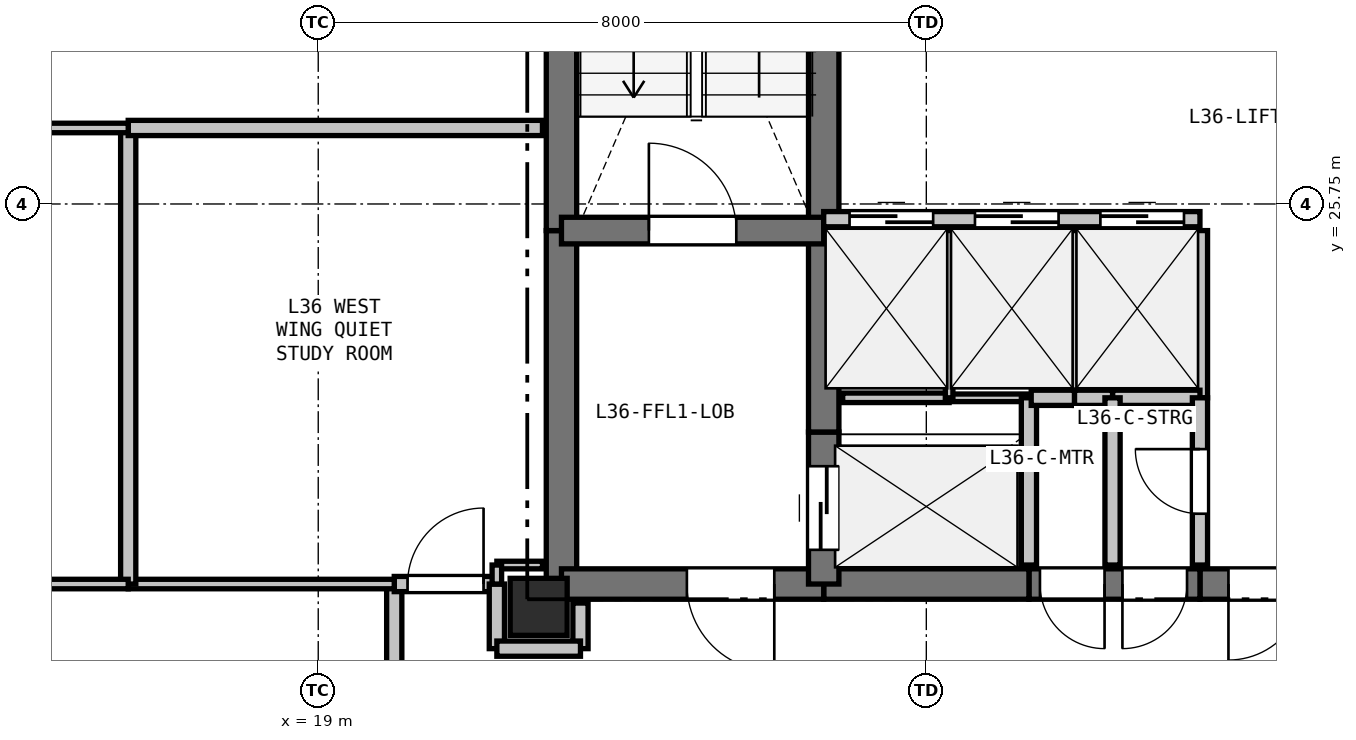
"""IFC4 building model, lengths in metres.
Left out: names, types, materials, properties, quantities, classifications, styles, units other than length and angle.
Written with IfcOpenShell. Run it as: python <this file> out.ifc"""

import sys

from ifc_helpers import new_model, si_unit, direction, frame, frame_2d, origin, origin_2d, place, context, subcontext, project, spatial, rectangle, extrude, element, fill, save


model = new_model("IFC4")
c1 = context("Model", 3, precision=1e-05, world=origin(), true_north=direction((0.0, 1.0)))
c2 = subcontext(c1, "Body", "Model", "MODEL_VIEW")
j1 = project(units=[si_unit("LENGTHUNIT", "METRE"), si_unit("PLANEANGLEUNIT", "RADIAN")], contexts=[c1])
p1 = place(None, origin())
s1 = spatial("IfcSite", under=j1, at=p1, CompositionType="ELEMENT")
p2 = place(p1, origin())
s2 = spatial("IfcBuilding", under=s1, at=p2, CompositionType="ELEMENT")
p3 = place(p2, frame((0.0, 0.0, 131.1)))
s3 = spatial("IfcBuildingStorey", under=s2, at=p3, CompositionType="ELEMENT", Elevation=131.1)
p4 = place(p3, frame((21.9, 20.45, 0.0), z_axis=(0.0, 0.0, 1.0), x_axis=(1.0, 0.0, 0.0)))
e1 = element("IfcColumn", 1, at=p4, inside=s3, PredefinedType="COLUMN", context=c2, shape_type="SweptSolid", body=[
    extrude(rectangle(XDim=0.75, YDim=0.75, at=origin_2d()), origin(), (0.0, 0.0, 1.0), 3.3),
])
p5 = place(p3, frame((16.378, 18.773, 0.0), z_axis=(0.0, 0.0, 1.0), x_axis=(-0.866027848477, 0.499995765644, 0.0)))
e2 = element("IfcWall", 2, at=p5, inside=s3, PredefinedType="SOLIDWALL", context=c2, shape_type="SweptSolid", body=[
    extrude(rectangle(XDim=11.186, YDim=0.25, at=frame_2d((5.593, 0.0))), origin(), (0.0, 0.0, 1.0), 2.68),
])
p6 = place(p5, frame((6.605, 0.0, 0.9)))
e3 = element("IfcOpeningElement", 3, at=p6, cuts=e2, PredefinedType="OPENING", context=c2, shape_type="SweptSolid", body=[
    extrude(rectangle(XDim=1.2, YDim=1.4, at=frame_2d((0.6, 0.7))), frame((0.0, 0.135, 0.0), z_axis=(0.0, -1.0, 0.0), x_axis=(1.0, 0.0, 0.0)), (0.0, 0.0, 1.0), 0.27),
])
p7 = place(p3, frame((22.2, 20.75, 0.0), z_axis=(0.0, 0.0, 1.0), x_axis=(0.0, 1.0, 0.0)))
e4 = element("IfcWall", 4, at=p7, inside=s3, PredefinedType="SHEAR", context=c2, shape_type="SweptSolid", body=[
    extrude(rectangle(XDim=4.65, YDim=0.4, at=frame_2d((2.325, 0.0))), origin(), (0.0, 0.0, 1.0), 3.06),
])
p8 = place(p3, frame((22.2, 25.4, 0.0), z_axis=(0.0, 0.0, 1.0), x_axis=(0.0, 1.0, 0.0)))
e5 = element("IfcWall", 5, at=p8, inside=s3, PredefinedType="SHEAR", context=c2, shape_type="SweptSolid", body=[
    extrude(rectangle(XDim=7.35, YDim=0.4, at=frame_2d((3.675, 0.0))), origin(), (0.0, 0.0, 1.0), 3.06),
])
p9 = place(p3, frame((32.35, 20.75, 0.0), z_axis=(0.0, 0.0, 1.0), x_axis=(-1.0, 0.0, 0.0)))
e6 = element("IfcWall", 6, at=p9, inside=s3, PredefinedType="SHEAR", context=c2, shape_type="SweptSolid", body=[
    extrude(rectangle(XDim=1.75, YDim=0.4, at=frame_2d((0.875, 0.0))), origin(), (0.0, 0.0, 1.0), 3.06),
])
p10 = place(p9, frame((0.375, 0.0, 0.0)))
e7 = element("IfcOpeningElement", 7, at=p10, cuts=e6, PredefinedType="OPENING", context=c2, shape_type="SweptSolid", body=[
    extrude(rectangle(XDim=1.0, YDim=2.15, at=frame_2d((0.5, 1.075))), frame((0.0, 0.21, 0.0), z_axis=(0.0, -1.0, 0.0), x_axis=(1.0, 0.0, 0.0)), (0.0, 0.0, 1.0), 0.42),
])
p11 = place(p3, frame((30.6, 20.75, 0.0), z_axis=(0.0, 0.0, 1.0), x_axis=(-1.0, 0.0, 0.0)))
e8 = element("IfcWall", 8, at=p11, inside=s3, PredefinedType="SHEAR", context=c2, shape_type="SweptSolid", body=[
    extrude(rectangle(XDim=2.25, YDim=0.4, at=frame_2d((1.125, 0.0))), origin(), (0.0, 0.0, 1.0), 3.06),
])
p12 = place(p11, frame((1.255, 0.0, 0.0)))
e9 = element("IfcOpeningElement", 9, at=p12, cuts=e8, PredefinedType="OPENING", context=c2, shape_type="SweptSolid", body=[
    extrude(rectangle(XDim=0.85, YDim=2.1, at=frame_2d((0.425, 1.05))), frame((0.0, 0.21, 0.0), z_axis=(0.0, -1.0, 0.0), x_axis=(1.0, 0.0, 0.0)), (0.0, 0.0, 1.0), 0.42),
])
p13 = place(p11, frame((0.17, 0.0, 0.0)))
e10 = element("IfcOpeningElement", 10, at=p13, cuts=e8, PredefinedType="OPENING", context=c2, shape_type="SweptSolid", body=[
    extrude(rectangle(XDim=0.85, YDim=2.1, at=frame_2d((0.425, 1.05))), frame((0.0, 0.21, 0.0), z_axis=(0.0, -1.0, 0.0), x_axis=(1.0, 0.0, 0.0)), (0.0, 0.0, 1.0), 0.42),
])
p14 = place(p3, frame((28.35, 20.75, 0.0), z_axis=(0.0, 0.0, 1.0), x_axis=(-1.0, 0.0, 0.0)))
e11 = element("IfcWall", 11, at=p14, inside=s3, PredefinedType="SHEAR", context=c2, shape_type="SweptSolid", body=[
    extrude(rectangle(XDim=2.7, YDim=0.4, at=frame_2d((1.35, 0.0))), origin(), (0.0, 0.0, 1.0), 3.06),
])
p15 = place(p3, frame((25.65, 20.75, 0.0), z_axis=(0.0, 0.0, 1.0), x_axis=(-1.0, 0.0, 0.0)))
e12 = element("IfcWall", 12, at=p15, inside=s3, PredefinedType="SHEAR", context=c2, shape_type="SweptSolid", body=[
    extrude(rectangle(XDim=3.45, YDim=0.4, at=frame_2d((1.725, 0.0))), origin(), (0.0, 0.0, 1.0), 3.06),
])
p16 = place(p15, frame((0.65, 0.0, 0.0)))
e13 = element("IfcOpeningElement", 13, at=p16, cuts=e12, PredefinedType="OPENING", context=c2, shape_type="SweptSolid", body=[
    extrude(rectangle(XDim=1.15, YDim=2.15, at=frame_2d((0.575, 1.075))), frame((0.0, 0.21, 0.0), z_axis=(0.0, -1.0, 0.0), x_axis=(1.0, 0.0, 0.0)), (0.0, 0.0, 1.0), 0.42),
])
p17 = place(p3, frame((25.65, 20.75, 0.0), z_axis=(0.0, 0.0, 1.0), x_axis=(0.0, 1.0, 0.0)))
e14 = element("IfcWall", 14, at=p17, inside=s3, PredefinedType="SHEAR", context=c2, shape_type="SweptSolid", body=[
    extrude(rectangle(XDim=2.0, YDim=0.4, at=frame_2d((1.0, 0.0))), origin(), (0.0, 0.0, 1.0), 3.06),
])
p18 = place(p17, frame((0.45, 0.0, 0.0)))
e15 = element("IfcOpeningElement", 15, at=p18, cuts=e14, PredefinedType="OPENING", context=c2, shape_type="SweptSolid", body=[
    extrude(rectangle(XDim=1.1, YDim=2.15, at=frame_2d((0.55, 1.075))), frame((0.0, 0.21, 0.0), z_axis=(0.0, -1.0, 0.0), x_axis=(1.0, 0.0, 0.0)), (0.0, 0.0, 1.0), 0.42),
])
p19 = place(p3, frame((25.65, 22.75, 0.0), z_axis=(0.0, 0.0, 1.0), x_axis=(0.0, 1.0, 0.0)))
e16 = element("IfcWall", 16, at=p19, inside=s3, PredefinedType="SHEAR", context=c2, shape_type="SweptSolid", body=[
    extrude(rectangle(XDim=2.8, YDim=0.4, at=frame_2d((1.4, 0.0))), origin(), (0.0, 0.0, 1.0), 3.06),
])
p20 = place(p3, frame((25.65, 25.55, 0.0), z_axis=(0.0, 0.0, 1.0), x_axis=(0.0, 1.0, 0.0)))
e17 = element("IfcWall", 17, at=p20, inside=s3, PredefinedType="SHEAR", context=c2, shape_type="SweptSolid", body=[
    extrude(rectangle(XDim=2.4, YDim=0.4, at=frame_2d((1.2, 0.0))), origin(), (0.0, 0.0, 1.0), 3.06),
])
p21 = place(p3, frame((22.2, 25.4, 0.0), z_axis=(0.0, 0.0, 1.0), x_axis=(1.0, 0.0, 0.0)))
e18 = element("IfcWall", 18, at=p21, inside=s3, PredefinedType="SHEAR", context=c2, shape_type="SweptSolid", body=[
    extrude(rectangle(XDim=3.45, YDim=0.35, at=frame_2d((1.725, 0.0))), origin(), (0.0, 0.0, 1.0), 3.06),
])
p22 = place(p21, frame((1.15, 0.0, 0.0)))
e19 = element("IfcOpeningElement", 19, at=p22, cuts=e18, PredefinedType="OPENING", context=c2, shape_type="SweptSolid", body=[
    extrude(rectangle(XDim=1.15, YDim=2.15, at=frame_2d((0.575, 1.075))), frame((0.0, 0.185, 0.0), z_axis=(0.0, -1.0, 0.0), x_axis=(1.0, 0.0, 0.0)), (0.0, 0.0, 1.0), 0.37),
])
p23 = place(p3, frame((25.65, 25.55, 0.0), z_axis=(0.0, 0.0, 1.0), x_axis=(1.0, 0.0, 0.0)))
e20 = element("IfcWall", 20, at=p23, inside=s3, PredefinedType="PARTITIONING", context=c2, shape_type="SweptSolid", body=[
    extrude(rectangle(XDim=4.95, YDim=0.2, at=frame_2d((2.475, 0.0))), origin(), (0.0, 0.0, 1.0), 3.06),
])
p24 = place(p23, frame((0.34, 0.0, 0.0)))
e21 = element("IfcOpeningElement", 21, at=p24, cuts=e20, PredefinedType="OPENING", context=c2, shape_type="SweptSolid", body=[
    extrude(rectangle(XDim=1.1, YDim=2.15, at=frame_2d((0.55, 1.075))), frame((0.0, 0.11, 0.0), z_axis=(0.0, -1.0, 0.0), x_axis=(1.0, 0.0, 0.0)), (0.0, 0.0, 1.0), 0.22),
])
p25 = place(p23, frame((1.99, 0.0, 0.0)))
e22 = element("IfcOpeningElement", 22, at=p25, cuts=e20, PredefinedType="OPENING", context=c2, shape_type="SweptSolid", body=[
    extrude(rectangle(XDim=1.1, YDim=2.15, at=frame_2d((0.55, 1.075))), frame((0.0, 0.11, 0.0), z_axis=(0.0, -1.0, 0.0), x_axis=(1.0, 0.0, 0.0)), (0.0, 0.0, 1.0), 0.22),
])
p26 = place(p23, frame((3.64, 0.0, 0.0)))
e23 = element("IfcOpeningElement", 23, at=p26, cuts=e20, PredefinedType="OPENING", context=c2, shape_type="SweptSolid", body=[
    extrude(rectangle(XDim=1.1, YDim=2.15, at=frame_2d((0.55, 1.075))), frame((0.0, 0.11, 0.0), z_axis=(0.0, -1.0, 0.0), x_axis=(1.0, 0.0, 0.0)), (0.0, 0.0, 1.0), 0.22),
])
p27 = place(p3, frame((25.9, 23.2, 0.0), z_axis=(0.0, 0.0, 1.0), x_axis=(1.0, 0.0, 0.0)))
e24 = element("IfcWall", 24, at=p27, inside=s3, PredefinedType="PARTITIONING", context=c2, shape_type="SweptSolid", body=[
    extrude(rectangle(XDim=1.4, YDim=0.125, at=frame_2d((0.7, 0.0))), origin(), (0.0, 0.0, 1.0), 3.06),
])
p28 = place(p3, frame((27.3, 23.2, 0.0), z_axis=(0.0, 0.0, 1.0), x_axis=(1.0, 0.0, 0.0)))
e25 = element("IfcWall", 25, at=p28, inside=s3, PredefinedType="PARTITIONING", context=c2, shape_type="SweptSolid", body=[
    extrude(rectangle(XDim=1.05, YDim=0.1, at=frame_2d((0.525, 0.0))), origin(), (0.0, 0.0, 1.0), 3.06),
])
p29 = place(p3, frame((28.35, 23.2, 0.0), z_axis=(0.0, 0.0, 1.0), x_axis=(0.0, -1.0, 0.0)))
e26 = element("IfcWall", 26, at=p29, inside=s3, PredefinedType="PARTITIONING", context=c2, shape_type="SweptSolid", body=[
    extrude(rectangle(XDim=2.2, YDim=0.2, at=frame_2d((1.1, 0.0))), origin(), (0.0, 0.0, 1.0), 3.06),
])
p30 = place(p3, frame((27.3, 25.4, 0.0), z_axis=(0.0, 0.0, 1.0), x_axis=(0.0, -1.0, 0.0)))
e27 = element("IfcWall", 27, at=p30, inside=s3, PredefinedType="PARTITIONING", context=c2, shape_type="SweptSolid", body=[
    extrude(rectangle(XDim=2.2, YDim=0.1, at=frame_2d((1.1, 0.0))), origin(), (0.0, 0.0, 1.0), 3.06),
])
p31 = place(p3, frame((28.95, 25.4, 0.0), z_axis=(0.0, 0.0, 1.0), x_axis=(0.0, -1.0, 0.0)))
e28 = element("IfcWall", 28, at=p31, inside=s3, PredefinedType="PARTITIONING", context=c2, shape_type="SweptSolid", body=[
    extrude(rectangle(XDim=2.2, YDim=0.125, at=frame_2d((1.1, 0.0))), origin(), (0.0, 0.0, 1.0), 3.06),
])
p32 = place(p3, frame((28.95, 23.2, 0.0), z_axis=(0.0, 0.0, 1.0), x_axis=(-1.0, 0.0, 0.0)))
e29 = element("IfcWall", 29, at=p32, inside=s3, PredefinedType="PARTITIONING", context=c2, shape_type="SweptSolid", body=[
    extrude(rectangle(XDim=0.57, YDim=0.2, at=frame_2d((0.285, 0.0))), origin(), (0.0, 0.0, 1.0), 3.06),
])
p33 = place(p3, frame((30.6, 25.4, 0.0), z_axis=(0.0, 0.0, 1.0), x_axis=(0.0, -1.0, 0.0)))
e30 = element("IfcWall", 30, at=p33, inside=s3, PredefinedType="PARTITIONING", context=c2, shape_type="SweptSolid", body=[
    extrude(rectangle(XDim=2.2, YDim=0.2, at=frame_2d((1.1, 0.0))), origin(), (0.0, 0.0, 1.0), 3.06),
])
p34 = place(p3, frame((30.6, 23.2, 0.0), z_axis=(0.0, 0.0, 1.0), x_axis=(-1.0, 0.0, 0.0)))
e31 = element("IfcWall", 31, at=p34, inside=s3, PredefinedType="PARTITIONING", context=c2, shape_type="SweptSolid", body=[
    extrude(rectangle(XDim=1.15, YDim=0.2, at=frame_2d((0.575, 0.0))), origin(), (0.0, 0.0, 1.0), 3.06),
])
p35 = place(p3, frame((29.45, 23.2, 0.0), z_axis=(0.0, 0.0, 1.0), x_axis=(-1.0, 0.0, 0.0)))
e32 = element("IfcWall", 32, at=p35, inside=s3, PredefinedType="PARTITIONING", context=c2, shape_type="SweptSolid", body=[
    extrude(rectangle(XDim=0.5, YDim=0.2, at=frame_2d((0.25, 0.0))), origin(), (0.0, 0.0, 1.0), 3.06),
])
p36 = place(p3, frame((30.6, 21.0, 0.0), z_axis=(0.0, 0.0, 1.0), x_axis=(0.0, 1.0, 0.0)))
e33 = element("IfcWall", 33, at=p36, inside=s3, PredefinedType="PARTITIONING", context=c2, shape_type="SweptSolid", body=[
    extrude(rectangle(XDim=2.2, YDim=0.2, at=frame_2d((1.1, 0.0))), origin(), (0.0, 0.0, 1.0), 3.06),
])
p37 = place(p36, frame((0.675, 0.0, 0.0)))
e34 = element("IfcOpeningElement", 34, at=p37, cuts=e33, PredefinedType="OPENING", context=c2, shape_type="SweptSolid", body=[
    extrude(rectangle(XDim=0.85, YDim=2.1, at=frame_2d((0.425, 1.05))), frame((0.0, 0.11, 0.0), z_axis=(0.0, -1.0, 0.0), x_axis=(1.0, 0.0, 0.0)), (0.0, 0.0, 1.0), 0.22),
])
p38 = place(p3, frame((22.45, 19.9, 0.0), z_axis=(0.0, 0.0, 1.0), x_axis=(0.0, 1.0, 0.0)))
e35 = element("IfcWall", 35, at=p38, inside=s3, PredefinedType="PARTITIONING", context=c2, shape_type="SweptSolid", body=[
    extrude(rectangle(XDim=0.6, YDim=0.2, at=frame_2d((0.3, 0.0))), origin(), (0.0, 0.0, 1.0), 2.433),
])
p39 = place(p3, frame((20.0, 18.15, 0.0), z_axis=(0.0, 0.0, 1.0), x_axis=(0.0, 1.0, 0.0)))
e36 = element("IfcWall", 36, at=p39, inside=s3, PredefinedType="PARTITIONING", context=c2, shape_type="SweptSolid", body=[
    extrude(rectangle(XDim=2.6, YDim=0.2, at=frame_2d((1.3, 0.0))), origin(), (0.0, 0.0, 1.0), 3.06),
])
p40 = place(p3, frame((20.0, 20.75, 0.0), z_axis=(0.0, 0.0, 1.0), x_axis=(1.0, 0.0, 0.0)))
e37 = element("IfcWall", 37, at=p40, inside=s3, PredefinedType="PARTITIONING", context=c2, shape_type="SweptSolid", body=[
    extrude(rectangle(XDim=1.35, YDim=0.2, at=frame_2d((0.675, 0.0))), origin(), (0.0, 0.0, 1.0), 2.433),
])
p41 = place(p40, frame((0.175, 0.0, 0.0)))
e38 = element("IfcOpeningElement", 38, at=p41, cuts=e37, PredefinedType="OPENING", context=c2, shape_type="SweptSolid", body=[
    extrude(rectangle(XDim=1.0, YDim=2.15, at=frame_2d((0.5, 1.075))), frame((0.0, 0.11, 0.0), z_axis=(0.0, -1.0, 0.0), x_axis=(1.0, 0.0, 0.0)), (0.0, 0.0, 1.0), 0.22),
])
p42 = place(p3, frame((21.35, 20.75, 0.0), z_axis=(0.0, 0.0, 1.0), x_axis=(0.0, -1.0, 0.0)))
e39 = element("IfcWall", 39, at=p42, inside=s3, PredefinedType="PARTITIONING", context=c2, shape_type="SweptSolid", body=[
    extrude(rectangle(XDim=0.85, YDim=0.2, at=frame_2d((0.425, 0.0))), origin(), (0.0, 0.0, 1.0), 2.433),
])
p43 = place(p3, frame((21.35, 19.9, 0.0), z_axis=(0.0, 0.0, 1.0), x_axis=(1.0, 0.0, 0.0)))
e40 = element("IfcWall", 40, at=p43, inside=s3, PredefinedType="PARTITIONING", context=c2, shape_type="SweptSolid", body=[
    extrude(rectangle(XDim=1.1, YDim=0.2, at=frame_2d((0.55, 0.0))), origin(), (0.0, 0.0, 1.0), 2.433),
])
p44 = place(p3, frame((29.45, 23.2, 0.0), z_axis=(0.0, 0.0, 1.0), x_axis=(0.0, -1.0, 0.0)))
e41 = element("IfcWall", 41, at=p44, inside=s3, PredefinedType="PARTITIONING", context=c2, shape_type="SweptSolid", body=[
    extrude(rectangle(XDim=2.2, YDim=0.2, at=frame_2d((1.1, 0.0))), origin(), (0.0, 0.0, 1.0), 3.06),
])
p45 = place(p3, frame((20.0, 20.75, 0.0), z_axis=(0.0, 0.0, 1.0), x_axis=(-1.0, 0.0, 0.0)))
e42 = element("IfcWall", 42, at=p45, inside=s3, PredefinedType="PARTITIONING", context=c2, shape_type="SweptSolid", body=[
    extrude(rectangle(XDim=3.5, YDim=0.125, at=frame_2d((1.75, 0.0))), origin(), (0.0, 0.0, 1.0), 3.06),
])
p46 = place(p3, frame((16.5, 20.75, 0.0), z_axis=(0.0, 0.0, 1.0), x_axis=(0.0, 1.0, 0.0)))
e43 = element("IfcWall", 43, at=p46, inside=s3, PredefinedType="PARTITIONING", context=c2, shape_type="SweptSolid", body=[
    extrude(rectangle(XDim=6.0, YDim=0.2, at=frame_2d((3.0, 0.0))), origin(), (0.0, 0.0, 1.0), 2.433),
])
p47 = place(p3, frame((16.5, 26.75, 0.0), z_axis=(0.0, 0.0, 1.0), x_axis=(1.0, 0.0, 0.0)))
e44 = element("IfcWall", 44, at=p47, inside=s3, PredefinedType="PARTITIONING", context=c2, shape_type="SweptSolid", body=[
    extrude(rectangle(XDim=5.45, YDim=0.2, at=frame_2d((2.725, 0.0))), origin(), (0.0, 0.0, 1.0), 2.508),
])
p48 = place(p3, frame((21.95, 21.0, 0.0), z_axis=(0.0, 0.0, 1.0), x_axis=(-1.0, 0.0, 0.0)))
e45 = element("IfcWall", 45, at=p48, inside=s3, PredefinedType="PARTITIONING", context=c2, shape_type="SweptSolid", body=[
    extrude(rectangle(XDim=0.6, YDim=0.1, at=frame_2d((0.3, 0.0))), origin(), (0.0, 0.0, 1.0), 2.508),
])
p49 = place(p3, frame((21.35, 21.0, 0.0), z_axis=(0.0, 0.0, 1.0), x_axis=(0.0, -1.0, 0.0)))
e46 = element("IfcWall", 46, at=p49, inside=s3, PredefinedType="PARTITIONING", context=c2, shape_type="SweptSolid", body=[
    extrude(rectangle(XDim=0.25, YDim=0.125, at=frame_2d((0.125, 0.0))), origin(), (0.0, 0.0, 1.0), 3.06),
])
p50 = place(p3, frame((16.5, 26.75, 0.0), z_axis=(0.0, 0.0, 1.0), x_axis=(-1.0, 0.0, 0.0)))
e47 = element("IfcWall", 47, at=p50, inside=s3, PredefinedType="PARTITIONING", context=c2, shape_type="SweptSolid", body=[
    extrude(rectangle(XDim=9.791, YDim=0.125, at=frame_2d((4.896, 0.0))), origin(), (0.0, 0.0, 1.0), 2.724),
])
p51 = place(p50, frame((4.42, 0.0, 0.0)))
e48 = element("IfcOpeningElement", 48, at=p51, cuts=e47, PredefinedType="OPENING", context=c2, shape_type="SweptSolid", body=[
    extrude(rectangle(XDim=0.95, YDim=2.1, at=frame_2d((0.475, 1.05))), frame((0.0, 0.073, 0.0), z_axis=(0.0, -1.0, 0.0), x_axis=(1.0, 0.0, 0.0)), (0.0, 0.0, 1.0), 0.145),
])
p52 = place(p3, frame((16.5, 20.75, 0.0), z_axis=(0.0, 0.0, 1.0), x_axis=(-1.0, 0.0, 0.0)))
e49 = element("IfcWall", 49, at=p52, inside=s3, PredefinedType="PARTITIONING", context=c2, shape_type="SweptSolid", body=[
    extrude(rectangle(XDim=3.275, YDim=0.125, at=frame_2d((1.638, 0.0))), origin(), (0.0, 0.0, 1.0), 2.365),
])
p53 = place(p24, origin())
e50 = element("IfcDoor", 50, at=p53, inside=s3, OperationType="SLIDING_TO_LEFT", PredefinedType="DOOR", context=c2, shape_type="SweptSolid", body=[
    extrude(rectangle(XDim=1.1, YDim=2.15, at=frame_2d((0.55, 1.075))), frame((0.0, 0.025, 0.0), z_axis=(0.0, -1.0, 0.0), x_axis=(1.0, 0.0, 0.0)), (0.0, 0.0, 1.0), 0.05),
])
fill(e21, e50)
p54 = place(p25, origin())
e51 = element("IfcDoor", 51, at=p54, inside=s3, OperationType="SLIDING_TO_LEFT", PredefinedType="DOOR", context=c2, shape_type="SweptSolid", body=[
    extrude(rectangle(XDim=1.1, YDim=2.15, at=frame_2d((0.55, 1.075))), frame((0.0, 0.025, 0.0), z_axis=(0.0, -1.0, 0.0), x_axis=(1.0, 0.0, 0.0)), (0.0, 0.0, 1.0), 0.05),
])
fill(e22, e51)
p55 = place(p26, origin())
e52 = element("IfcDoor", 52, at=p55, inside=s3, OperationType="SLIDING_TO_LEFT", PredefinedType="DOOR", context=c2, shape_type="SweptSolid", body=[
    extrude(rectangle(XDim=1.1, YDim=2.15, at=frame_2d((0.55, 1.075))), frame((0.0, 0.025, 0.0), z_axis=(0.0, -1.0, 0.0), x_axis=(1.0, 0.0, 0.0)), (0.0, 0.0, 1.0), 0.05),
])
fill(e23, e52)
p56 = place(p10, origin())
e53 = element("IfcDoor", 53, at=p56, inside=s3, OperationType="SINGLE_SWING_RIGHT", PredefinedType="DOOR", context=c2, shape_type="SweptSolid", body=[
    extrude(rectangle(XDim=1.0, YDim=2.15, at=frame_2d((0.5, 1.075))), frame((0.0, 0.025, 0.0), z_axis=(0.0, -1.0, 0.0), x_axis=(1.0, 0.0, 0.0)), (0.0, 0.0, 1.0), 0.05),
])
fill(e7, e53)
p57 = place(p18, origin())
e54 = element("IfcDoor", 54, at=p57, inside=s3, OperationType="SLIDING_TO_LEFT", PredefinedType="DOOR", context=c2, shape_type="SweptSolid", body=[
    extrude(rectangle(XDim=1.1, YDim=2.15, at=frame_2d((0.55, 1.075))), frame((0.0, 0.025, 0.0), z_axis=(0.0, -1.0, 0.0), x_axis=(1.0, 0.0, 0.0)), (0.0, 0.0, 1.0), 0.05),
])
fill(e15, e54)
p58 = place(p22, origin())
e55 = element("IfcDoor", 55, at=p58, inside=s3, OperationType="SINGLE_SWING_LEFT", PredefinedType="DOOR", context=c2, shape_type="SweptSolid", body=[
    extrude(rectangle(XDim=1.15, YDim=2.15, at=frame_2d((0.575, 1.075))), frame((0.0, 0.025, 0.0), z_axis=(0.0, -1.0, 0.0), x_axis=(1.0, 0.0, 0.0)), (0.0, 0.0, 1.0), 0.05),
])
fill(e19, e55)
p59 = place(p16, origin())
e56 = element("IfcDoor", 56, at=p59, inside=s3, OperationType="SINGLE_SWING_LEFT", PredefinedType="DOOR", context=c2, shape_type="SweptSolid", body=[
    extrude(rectangle(XDim=1.15, YDim=2.15, at=frame_2d((0.575, 1.075))), frame((0.0, 0.025, 0.0), z_axis=(0.0, -1.0, 0.0), x_axis=(1.0, 0.0, 0.0)), (0.0, 0.0, 1.0), 0.05),
])
fill(e13, e56)
p60 = place(p37, origin())
e57 = element("IfcDoor", 57, at=p60, inside=s3, OperationType="SINGLE_SWING_RIGHT", PredefinedType="DOOR", context=c2, shape_type="SweptSolid", body=[
    extrude(rectangle(XDim=0.85, YDim=2.1, at=frame_2d((0.425, 1.05))), frame((0.0, 0.025, 0.0), z_axis=(0.0, -1.0, 0.0), x_axis=(1.0, 0.0, 0.0)), (0.0, 0.0, 1.0), 0.05),
])
fill(e34, e57)
p61 = place(p12, origin())
e58 = element("IfcDoor", 58, at=p61, inside=s3, OperationType="SINGLE_SWING_LEFT", PredefinedType="DOOR", context=c2, shape_type="SweptSolid", body=[
    extrude(rectangle(XDim=0.85, YDim=2.1, at=frame_2d((0.425, 1.05))), frame((0.0, 0.025, 0.0), z_axis=(0.0, -1.0, 0.0), x_axis=(1.0, 0.0, 0.0)), (0.0, 0.0, 1.0), 0.05),
])
fill(e9, e58)
p62 = place(p13, origin())
e59 = element("IfcDoor", 59, at=p62, inside=s3, OperationType="SINGLE_SWING_RIGHT", PredefinedType="DOOR", context=c2, shape_type="SweptSolid", body=[
    extrude(rectangle(XDim=0.85, YDim=2.1, at=frame_2d((0.425, 1.05))), frame((0.0, 0.025, 0.0), z_axis=(0.0, -1.0, 0.0), x_axis=(1.0, 0.0, 0.0)), (0.0, 0.0, 1.0), 0.05),
])
fill(e10, e59)
p63 = place(p41, origin())
e60 = element("IfcDoor", 60, at=p63, inside=s3, OperationType="SINGLE_SWING_RIGHT", PredefinedType="DOOR", context=c2, shape_type="SweptSolid", body=[
    extrude(rectangle(XDim=1.0, YDim=2.15, at=frame_2d((0.5, 1.075))), frame((0.0, 0.025, 0.0), z_axis=(0.0, -1.0, 0.0), x_axis=(1.0, 0.0, 0.0)), (0.0, 0.0, 1.0), 0.05),
])
fill(e38, e60)
save(model, sys.argv[1])
